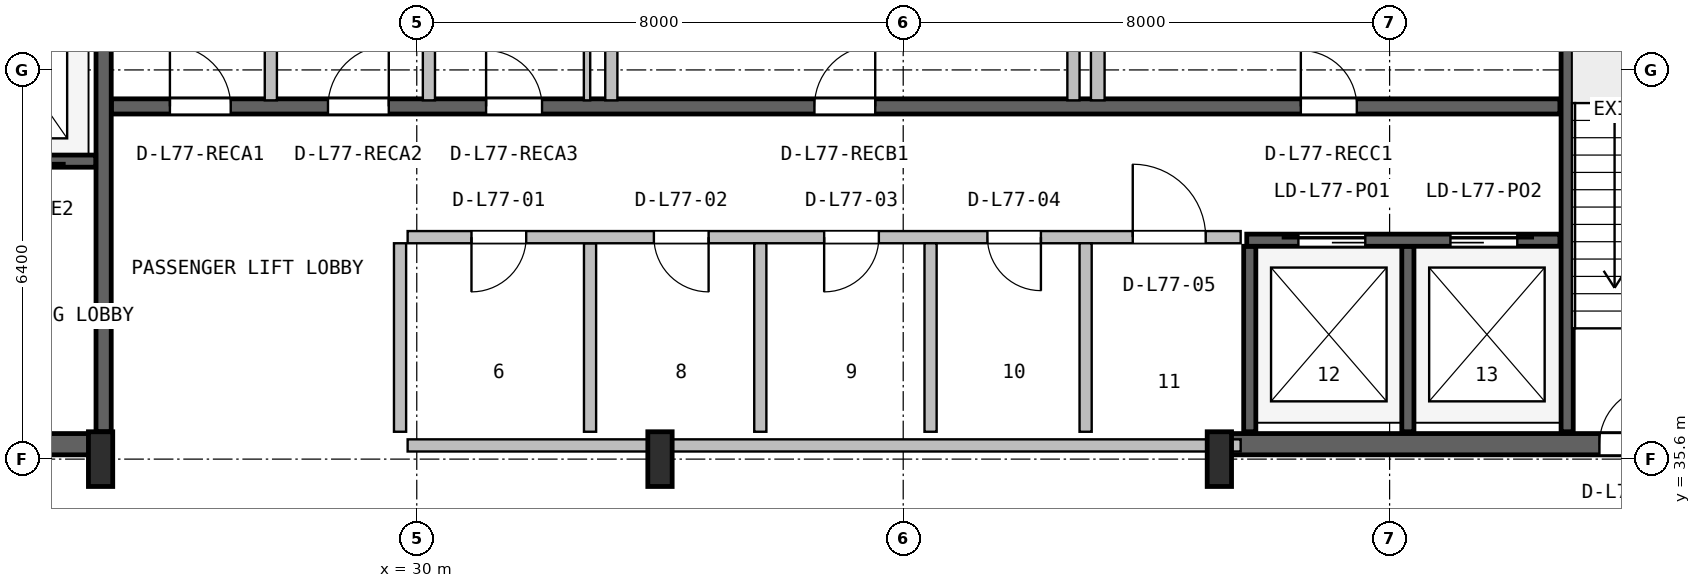
"""IFC4 building model, lengths in metres.
Left out: names, types, materials, properties, quantities, classifications, styles, units other than length and angle.
Written with IfcOpenShell. Run it as: python <this file> out.ifc"""

import sys

from ifc_helpers import new_model, si_unit, direction, frame, frame_2d, origin, origin_2d, place, context, subcontext, project, spatial, rectangle, i_section, extrude, source, transform, mapped, element, fill, save


model = new_model("IFC4")
c1 = context("Model", 3, precision=1e-05, world=origin(), true_north=direction((0.0, 1.0)))
c2 = subcontext(c1, "Body", "Model", "MODEL_VIEW")
j1 = project(units=[si_unit("LENGTHUNIT", "METRE"), si_unit("PLANEANGLEUNIT", "RADIAN")], contexts=[c1])
p1 = place(None, origin())
s1 = spatial("IfcSite", under=j1, at=p1, CompositionType="ELEMENT")
p2 = place(p1, origin())
s2 = spatial("IfcBuilding", under=s1, at=p2, CompositionType="ELEMENT")
p3 = place(p2, frame((0.0, 0.0, 309.8)))
s3 = spatial("IfcBuildingStorey", under=s2, at=p3, CompositionType="ELEMENT", Elevation=309.8)
p4 = place(p3, frame((15.67, 35.845, 0.0), z_axis=(0.0, 0.0, 1.0), x_axis=(1.0, 0.0, 0.0)))
e1 = element("IfcWall", 1, at=p4, inside=s3, PredefinedType="SHEAR", context=c2, shape_type="SweptSolid", body=[
    extrude(rectangle(XDim=9.13, YDim=0.35, at=frame_2d((4.565, 0.0))), origin(), (0.0, 0.0, 1.0), 4.48),
])
p5 = place(p4, frame((5.4, 0.0, 0.0)))
e2 = element("IfcOpeningElement", 2, at=p5, cuts=e1, PredefinedType="OPENING", context=c2, shape_type="SweptSolid", body=[
    extrude(rectangle(XDim=1.0, YDim=2.1, at=frame_2d((0.5, 1.05))), frame((0.0, 0.185, 0.0), z_axis=(0.0, -1.0, 0.0), x_axis=(1.0, 0.0, 0.0)), (0.0, 0.0, 1.0), 0.37),
])
p6 = place(p3, frame((43.2, 35.845, 0.0), z_axis=(0.0, 0.0, 1.0), x_axis=(1.0, 0.0, 0.0)))
e3 = element("IfcWall", 3, at=p6, inside=s3, PredefinedType="SHEAR", context=c2, shape_type="SweptSolid", body=[
    extrude(rectangle(XDim=9.13, YDim=0.35, at=frame_2d((4.565, 0.0))), origin(), (0.0, 0.0, 1.0), 4.48),
])
p7 = place(p6, frame((6.25, 0.0, 0.0)))
e4 = element("IfcOpeningElement", 4, at=p7, cuts=e3, PredefinedType="OPENING", context=c2, shape_type="SweptSolid", body=[
    extrude(rectangle(XDim=0.95, YDim=2.1, at=frame_2d((0.475, 1.05))), frame((0.0, 0.185, 0.0), z_axis=(0.0, -1.0, 0.0), x_axis=(1.0, 0.0, 0.0)), (0.0, 0.0, 1.0), 0.37),
])
m1 = source(origin(), c2, "Body", "SweptSolid", [
    extrude(i_section(OverallWidth=0.4, OverallDepth=0.9, WebThickness=0.016, FlangeThickness=0.028, FilletRadius=0.016, at=origin_2d()), origin(), (0.0, 0.0, 1.0), 4.8),
])
for number, where, z_axis, x_axis in (
    (5, (24.8, 35.6, 0.0), (0.0, 0.0, 1.0), (1.0, 0.0, 0.0)),
    (6, (34.0, 35.6, 0.0), (0.0, 0.0, 1.0), (1.0, 0.0, 0.0)),
    (7, (43.2, 35.6, 0.0), (0.0, 0.0, 1.0), (1.0, 0.0, 0.0)),
):
    element("IfcColumn", number, at=place(p3, frame(where, z_axis=z_axis, x_axis=x_axis)), inside=s3, PredefinedType="COLUMN", context=c2, shape_type="MappedRepresentation", body=[
        mapped(m1, transform((0.0, 0.0, 0.0), x_axis=(1.0, 0.0, 0.0), y_axis=(0.0, 1.0, 0.0), z_axis=(0.0, 0.0, 1.0), scale=1.0)),
    ])
p8 = place(p3, frame((24.85, 36.05, 0.0), z_axis=(0.0, 0.0, 1.0), x_axis=(0.0, 1.0, 0.0)))
e8 = element("IfcWall", 8, at=p8, inside=s3, PredefinedType="SHEAR", context=c2, shape_type="SweptSolid", body=[
    extrude(rectangle(XDim=10.45, YDim=0.25, at=frame_2d((5.225, 0.0))), origin(), (0.0, 0.0, 1.0), 4.48),
])
p9 = place(p3, frame((19.2, 40.5, 0.0), z_axis=(0.0, 0.0, 1.0), x_axis=(1.0, 0.0, 0.0)))
e9 = element("IfcWall", 9, at=p9, inside=s3, PredefinedType="SHEAR", context=c2, shape_type="SweptSolid", body=[
    extrude(rectangle(XDim=5.52, YDim=0.2, at=frame_2d((2.76, 0.0))), origin(), (0.0, 0.0, 1.0), 4.48),
])
p10 = place(p9, frame((1.05, 0.0, 0.0)))
e10 = element("IfcOpeningElement", 10, at=p10, cuts=e9, PredefinedType="OPENING", context=c2, shape_type="SweptSolid", body=[
    extrude(rectangle(XDim=1.1, YDim=2.18, at=frame_2d((0.55, 1.09))), frame((0.0, 0.11, 0.0), z_axis=(0.0, -1.0, 0.0), x_axis=(1.0, 0.0, 0.0)), (0.0, 0.0, 1.0), 0.22),
])
p11 = place(p9, frame((3.65, 0.0, 0.0)))
e11 = element("IfcOpeningElement", 11, at=p11, cuts=e9, PredefinedType="OPENING", context=c2, shape_type="SweptSolid", body=[
    extrude(rectangle(XDim=1.1, YDim=2.18, at=frame_2d((0.55, 1.09))), frame((0.0, 0.11, 0.0), z_axis=(0.0, -1.0, 0.0), x_axis=(1.0, 0.0, 0.0)), (0.0, 0.0, 1.0), 0.22),
])
p12 = place(p3, frame((48.92, 36.05, 0.0), z_axis=(0.0, 0.0, 1.0), x_axis=(0.0, 1.0, 0.0)))
e12 = element("IfcWall", 12, at=p12, inside=s3, PredefinedType="SHEAR", context=c2, shape_type="SweptSolid", body=[
    extrude(rectangle(XDim=10.5, YDim=0.2, at=frame_2d((5.25, 0.0))), origin(), (0.0, 0.0, 1.0), 4.48),
])
p13 = place(p3, frame((24.98, 41.4, 0.0), z_axis=(0.0, 0.0, 1.0), x_axis=(1.0, 0.0, 0.0)))
e13 = element("IfcWall", 13, at=p13, inside=s3, PredefinedType="SHEAR", context=c2, shape_type="SweptSolid", body=[
    extrude(rectangle(XDim=23.82, YDim=0.25, at=frame_2d((11.91, 0.0))), origin(), (0.0, 0.0, 1.0), 4.48),
])
p14 = place(p13, frame((0.96, 0.0, 0.0)))
e14 = element("IfcOpeningElement", 14, at=p14, cuts=e13, PredefinedType="OPENING", context=c2, shape_type="SweptSolid", body=[
    extrude(rectangle(XDim=1.0, YDim=2.08, at=frame_2d((0.5, 1.04))), frame((0.0, 0.135, 0.0), z_axis=(0.0, -1.0, 0.0), x_axis=(1.0, 0.0, 0.0)), (0.0, 0.0, 1.0), 0.27),
])
p15 = place(p13, frame((3.56, 0.0, 0.0)))
e15 = element("IfcOpeningElement", 15, at=p15, cuts=e13, PredefinedType="OPENING", context=c2, shape_type="SweptSolid", body=[
    extrude(rectangle(XDim=1.0, YDim=2.08, at=frame_2d((0.5, 1.04))), frame((0.0, 0.135, 0.0), z_axis=(0.0, -1.0, 0.0), x_axis=(1.0, 0.0, 0.0)), (0.0, 0.0, 1.0), 0.27),
])
p16 = place(p13, frame((6.16, 0.0, 0.0)))
e16 = element("IfcOpeningElement", 16, at=p16, cuts=e13, PredefinedType="OPENING", context=c2, shape_type="SweptSolid", body=[
    extrude(rectangle(XDim=0.92, YDim=2.08, at=frame_2d((0.46, 1.04))), frame((0.0, 0.135, 0.0), z_axis=(0.0, -1.0, 0.0), x_axis=(1.0, 0.0, 0.0)), (0.0, 0.0, 1.0), 0.27),
])
p17 = place(p13, frame((11.56, 0.0, 0.0)))
e17 = element("IfcOpeningElement", 17, at=p17, cuts=e13, PredefinedType="OPENING", context=c2, shape_type="SweptSolid", body=[
    extrude(rectangle(XDim=1.0, YDim=2.08, at=frame_2d((0.5, 1.04))), frame((0.0, 0.135, 0.0), z_axis=(0.0, -1.0, 0.0), x_axis=(1.0, 0.0, 0.0)), (0.0, 0.0, 1.0), 0.27),
])
p18 = place(p13, frame((19.56, 0.0, 0.0)))
e18 = element("IfcOpeningElement", 18, at=p18, cuts=e13, PredefinedType="OPENING", context=c2, shape_type="SweptSolid", body=[
    extrude(rectangle(XDim=0.92, YDim=2.08, at=frame_2d((0.46, 1.04))), frame((0.0, 0.135, 0.0), z_axis=(0.0, -1.0, 0.0), x_axis=(1.0, 0.0, 0.0)), (0.0, 0.0, 1.0), 0.27),
])
for number, where, z_axis, x_axis in (
    (19, (43.7, 36.05, 0.0), (0.0, 0.0, 1.0), (0.0, 1.0, 0.0)),
    (20, (46.3, 36.05, 0.0), (0.0, 0.0, 1.0), (0.0, 1.0, 0.0)),
):
    element("IfcWall", number, at=place(p3, frame(where, z_axis=z_axis, x_axis=x_axis)), inside=s3, PredefinedType="SHEAR", context=c2, shape_type="SweptSolid", body=[
        extrude(rectangle(XDim=3.05, YDim=0.2, at=frame_2d((1.525, 0.0))), origin(), (0.0, 0.0, 1.0), 4.48),
    ])
p19 = place(p3, frame((43.65, 39.2, 0.0), z_axis=(0.0, 0.0, 1.0), x_axis=(1.0, 0.0, 0.0)))
e21 = element("IfcWall", 21, at=p19, inside=s3, PredefinedType="SHEAR", context=c2, shape_type="SweptSolid", body=[
    extrude(rectangle(XDim=5.15, YDim=0.2, at=frame_2d((2.575, 0.0))), origin(), (0.0, 0.0, 1.0), 4.48),
])
p20 = place(p19, frame((0.85, 0.0, 0.0)))
e22 = element("IfcOpeningElement", 22, at=p20, cuts=e21, PredefinedType="OPENING", context=c2, shape_type="SweptSolid", body=[
    extrude(rectangle(XDim=1.1, YDim=2.18, at=frame_2d((0.55, 1.09))), frame((0.0, 0.11, 0.0), z_axis=(0.0, -1.0, 0.0), x_axis=(1.0, 0.0, 0.0)), (0.0, 0.0, 1.0), 0.22),
])
p21 = place(p19, frame((3.35, 0.0, 0.0)))
e23 = element("IfcOpeningElement", 23, at=p21, cuts=e21, PredefinedType="OPENING", context=c2, shape_type="SweptSolid", body=[
    extrude(rectangle(XDim=1.1, YDim=2.18, at=frame_2d((0.55, 1.09))), frame((0.0, 0.11, 0.0), z_axis=(0.0, -1.0, 0.0), x_axis=(1.0, 0.0, 0.0)), (0.0, 0.0, 1.0), 0.22),
])
p22 = place(p3, frame((29.85, 35.825, 0.0), z_axis=(0.0, 0.0, 1.0), x_axis=(1.0, 0.0, 0.0)))
e24 = element("IfcWall", 24, at=p22, inside=s3, PredefinedType="SOLIDWALL", context=c2, shape_type="SweptSolid", body=[
    extrude(rectangle(XDim=13.7, YDim=0.2, at=frame_2d((6.85, 0.0))), origin(), (0.0, 0.0, 1.0), 3.505),
])
p23 = place(p3, frame((32.85, 36.05, 0.0), z_axis=(0.0, 0.0, 1.0), x_axis=(0.0, 1.0, 0.0)))
e25 = element("IfcWall", 25, at=p23, inside=s3, PredefinedType="PLUMBINGWALL", context=c2, shape_type="SweptSolid", body=[
    extrude(rectangle(XDim=3.1, YDim=0.2, at=frame_2d((1.55, 0.0))), origin(), (0.0, 0.0, 1.0), 4.46),
])
p24 = place(p3, frame((29.85, 39.25, 0.0), z_axis=(0.0, 0.0, 1.0), x_axis=(1.0, 0.0, 0.0)))
e26 = element("IfcWall", 26, at=p24, inside=s3, PredefinedType="SOLIDWALL", context=c2, shape_type="SweptSolid", body=[
    extrude(rectangle(XDim=13.7, YDim=0.2, at=frame_2d((6.85, 0.0))), origin(), (0.0, 0.0, 1.0), 4.46),
])
p25 = place(p24, frame((1.05, 0.0, 0.0)))
e27 = element("IfcOpeningElement", 27, at=p25, cuts=e26, PredefinedType="OPENING", context=c2, shape_type="SweptSolid", body=[
    extrude(rectangle(XDim=0.9, YDim=2.06, at=frame_2d((0.45, 1.03))), frame((0.0, 0.11, 0.0), z_axis=(0.0, -1.0, 0.0), x_axis=(1.0, 0.0, 0.0)), (0.0, 0.0, 1.0), 0.22),
])
p26 = place(p24, frame((4.05, 0.0, 0.0)))
e28 = element("IfcOpeningElement", 28, at=p26, cuts=e26, PredefinedType="OPENING", context=c2, shape_type="SweptSolid", body=[
    extrude(rectangle(XDim=0.9, YDim=2.06, at=frame_2d((0.45, 1.03))), frame((0.0, 0.11, 0.0), z_axis=(0.0, -1.0, 0.0), x_axis=(1.0, 0.0, 0.0)), (0.0, 0.0, 1.0), 0.22),
])
p27 = place(p24, frame((6.85, 0.0, 0.0)))
e29 = element("IfcOpeningElement", 29, at=p27, cuts=e26, PredefinedType="OPENING", context=c2, shape_type="SweptSolid", body=[
    extrude(rectangle(XDim=0.9, YDim=2.06, at=frame_2d((0.45, 1.03))), frame((0.0, 0.11, 0.0), z_axis=(0.0, -1.0, 0.0), x_axis=(1.0, 0.0, 0.0)), (0.0, 0.0, 1.0), 0.22),
])
p28 = place(p24, frame((9.535, 0.0, 0.0)))
e30 = element("IfcOpeningElement", 30, at=p28, cuts=e26, PredefinedType="OPENING", context=c2, shape_type="SweptSolid", body=[
    extrude(rectangle(XDim=0.88, YDim=2.06, at=frame_2d((0.44, 1.03))), frame((0.0, 0.11, 0.0), z_axis=(0.0, -1.0, 0.0), x_axis=(1.0, 0.0, 0.0)), (0.0, 0.0, 1.0), 0.22),
])
p29 = place(p24, frame((11.925, 0.0, 0.0)))
e31 = element("IfcOpeningElement", 31, at=p29, cuts=e26, PredefinedType="OPENING", context=c2, shape_type="SweptSolid", body=[
    extrude(rectangle(XDim=1.2, YDim=2.1, at=frame_2d((0.6, 1.05))), frame((0.0, 0.11, 0.0), z_axis=(0.0, -1.0, 0.0), x_axis=(1.0, 0.0, 0.0)), (0.0, 0.0, 1.0), 0.22),
])
for number, where, z_axis, x_axis in (
    (32, (29.725, 36.05, 0.0), (0.0, 0.0, 1.0), (0.0, 1.0, 0.0)),
    (33, (35.65, 36.05, 0.0), (0.0, 0.0, 1.0), (0.0, 1.0, 0.0)),
    (34, (38.45, 36.05, 0.0), (0.0, 0.0, 1.0), (0.0, 1.0, 0.0)),
):
    element("IfcWall", number, at=place(p3, frame(where, z_axis=z_axis, x_axis=x_axis)), inside=s3, PredefinedType="PLUMBINGWALL", context=c2, shape_type="SweptSolid", body=[
        extrude(rectangle(XDim=3.1, YDim=0.2, at=frame_2d((1.55, 0.0))), origin(), (0.0, 0.0, 1.0), 4.46),
    ])
p30 = place(p3, frame((41.0, 36.05, 0.0), z_axis=(0.0, 0.0, 1.0), x_axis=(0.0, 1.0, 0.0)))
e35 = element("IfcWall", 35, at=p30, inside=s3, PredefinedType="SOLIDWALL", context=c2, shape_type="SweptSolid", body=[
    extrude(rectangle(XDim=3.1, YDim=0.2, at=frame_2d((1.55, 0.0))), origin(), (0.0, 0.0, 1.0), 4.46),
])
for number, where, z_axis, x_axis in (
    (36, (27.6, 41.5, 0.0), (0.0, 0.0, 1.0), (0.0, 1.0, 0.0)),
    (37, (30.2, 41.5, 0.0), (0.0, 0.0, 1.0), (0.0, 1.0, 0.0)),
):
    element("IfcWall", number, at=place(p3, frame(where, z_axis=z_axis, x_axis=x_axis)), inside=s3, PredefinedType="SOLIDWALL", context=c2, shape_type="SweptSolid", body=[
        extrude(rectangle(XDim=5.02, YDim=0.2, at=frame_2d((2.51, 0.0))), origin(), (0.0, 0.0, 1.0), 4.46),
    ])
p31 = place(p3, frame((32.8, 41.5, 0.0), z_axis=(0.0, 0.0, 1.0), x_axis=(0.0, 1.0, 0.0)))
e38 = element("IfcWall", 38, at=p31, inside=s3, PredefinedType="PARTITIONING", context=c2, shape_type="SweptSolid", body=[
    extrude(rectangle(XDim=5.02, YDim=0.105, at=frame_2d((2.51, 0.0))), origin(), (0.0, 0.0, 1.0), 4.46),
])
for number, where, z_axis, x_axis in (
    (39, (40.8, 41.5, 0.0), (0.0, 0.0, 1.0), (0.0, 1.0, 0.0)),
    (40, (33.2, 41.5, 0.0), (0.0, 0.0, 1.0), (0.0, 1.0, 0.0)),
):
    element("IfcWall", number, at=place(p3, frame(where, z_axis=z_axis, x_axis=x_axis)), inside=s3, PredefinedType="SOLIDWALL", context=c2, shape_type="SweptSolid", body=[
        extrude(rectangle(XDim=5.02, YDim=0.2, at=frame_2d((2.51, 0.0))), origin(), (0.0, 0.0, 1.0), 4.46),
    ])
p32 = place(p3, frame((41.2, 41.5, 0.0), z_axis=(0.0, 0.0, 1.0), x_axis=(0.0, 1.0, 0.0)))
e41 = element("IfcWall", 41, at=p32, inside=s3, PredefinedType="PARTITIONING", context=c2, shape_type="SweptSolid", body=[
    extrude(rectangle(XDim=5.02, YDim=0.225, at=frame_2d((2.51, 0.0))), origin(), (0.0, 0.0, 1.0), 4.46),
])
m2 = source(origin(), c2, "Body", "SweptSolid", [
    extrude(rectangle(XDim=0.95, YDim=2.1, at=frame_2d((0.475, 1.05))), frame((0.0, 0.025, 0.0), z_axis=(0.0, -1.0, 0.0), x_axis=(1.0, 0.0, 0.0)), (0.0, 0.0, 1.0), 0.05),
])
p33 = place(p7, origin())
e42 = element("IfcDoor", 42, at=p33, inside=s3, OperationType="SINGLE_SWING_RIGHT", PredefinedType="DOOR", context=c2, shape_type="MappedRepresentation", body=[
    mapped(m2, transform((0.0, 0.0, 0.0), x_axis=(1.0, 0.0, 0.0), y_axis=(0.0, 1.0, 0.0), z_axis=(0.0, 0.0, 1.0), scale=1.0)),
])
fill(e4, e42)
m3 = source(origin(), c2, "Body", "SweptSolid", [
    extrude(rectangle(XDim=1.0, YDim=2.08, at=frame_2d((0.5, 1.04))), frame((0.0, 0.025, 0.0), z_axis=(0.0, -1.0, 0.0), x_axis=(1.0, 0.0, 0.0)), (0.0, 0.0, 1.0), 0.05),
])
p34 = place(p14, origin())
e43 = element("IfcDoor", 43, at=p34, inside=s3, OperationType="SINGLE_SWING_LEFT", PredefinedType="DOOR", context=c2, shape_type="MappedRepresentation", body=[
    mapped(m3, transform((0.0, 0.0, 0.0), x_axis=(1.0, 0.0, 0.0), y_axis=(0.0, 1.0, 0.0), z_axis=(0.0, 0.0, 1.0), scale=1.0)),
])
fill(e14, e43)
p35 = place(p15, origin())
e44 = element("IfcDoor", 44, at=p35, inside=s3, OperationType="SINGLE_SWING_RIGHT", PredefinedType="DOOR", context=c2, shape_type="MappedRepresentation", body=[
    mapped(m3, transform((0.0, 0.0, 0.0), x_axis=(1.0, 0.0, 0.0), y_axis=(0.0, 1.0, 0.0), z_axis=(0.0, 0.0, 1.0), scale=1.0)),
])
fill(e15, e44)
m4 = source(origin(), c2, "Body", "SweptSolid", [
    extrude(rectangle(XDim=0.92, YDim=2.08, at=frame_2d((0.46, 1.04))), frame((0.0, 0.025, 0.0), z_axis=(0.0, -1.0, 0.0), x_axis=(1.0, 0.0, 0.0)), (0.0, 0.0, 1.0), 0.05),
])
p36 = place(p16, origin())
e45 = element("IfcDoor", 45, at=p36, inside=s3, OperationType="SINGLE_SWING_LEFT", PredefinedType="DOOR", context=c2, shape_type="MappedRepresentation", body=[
    mapped(m4, transform((0.0, 0.0, 0.0), x_axis=(1.0, 0.0, 0.0), y_axis=(0.0, 1.0, 0.0), z_axis=(0.0, 0.0, 1.0), scale=1.0)),
])
fill(e16, e45)
p37 = place(p17, origin())
e46 = element("IfcDoor", 46, at=p37, inside=s3, OperationType="SINGLE_SWING_RIGHT", PredefinedType="DOOR", context=c2, shape_type="MappedRepresentation", body=[
    mapped(m3, transform((0.0, 0.0, 0.0), x_axis=(1.0, 0.0, 0.0), y_axis=(0.0, 1.0, 0.0), z_axis=(0.0, 0.0, 1.0), scale=1.0)),
])
fill(e17, e46)
p38 = place(p18, origin())
e47 = element("IfcDoor", 47, at=p38, inside=s3, OperationType="SINGLE_SWING_LEFT", PredefinedType="DOOR", context=c2, shape_type="MappedRepresentation", body=[
    mapped(m4, transform((0.0, 0.0, 0.0), x_axis=(1.0, 0.0, 0.0), y_axis=(0.0, 1.0, 0.0), z_axis=(0.0, 0.0, 1.0), scale=1.0)),
])
fill(e18, e47)
m5 = source(origin(), c2, "Body", "SweptSolid", [
    extrude(rectangle(XDim=1.1, YDim=2.18, at=frame_2d((0.55, 1.09))), frame((0.0, 0.025, 0.0), z_axis=(0.0, -1.0, 0.0), x_axis=(1.0, 0.0, 0.0)), (0.0, 0.0, 1.0), 0.05),
])
p39 = place(p20, origin())
e48 = element("IfcDoor", 48, at=p39, inside=s3, OperationType="SLIDING_TO_LEFT", PredefinedType="DOOR", context=c2, shape_type="MappedRepresentation", body=[
    mapped(m5, transform((0.0, 0.0, 0.0), x_axis=(1.0, 0.0, 0.0), y_axis=(0.0, 1.0, 0.0), z_axis=(0.0, 0.0, 1.0), scale=1.0)),
])
fill(e22, e48)
p40 = place(p21, origin())
e49 = element("IfcDoor", 49, at=p40, inside=s3, OperationType="SLIDING_TO_RIGHT", PredefinedType="DOOR", context=c2, shape_type="MappedRepresentation", body=[
    mapped(m5, transform((0.0, 0.0, 0.0), x_axis=(1.0, 0.0, 0.0), y_axis=(0.0, 1.0, 0.0), z_axis=(0.0, 0.0, 1.0), scale=1.0)),
])
fill(e23, e49)
m6 = source(origin(), c2, "Body", "SweptSolid", [
    extrude(rectangle(XDim=0.9, YDim=2.06, at=frame_2d((0.45, 1.03))), frame((0.0, 0.025, 0.0), z_axis=(0.0, -1.0, 0.0), x_axis=(1.0, 0.0, 0.0)), (0.0, 0.0, 1.0), 0.05),
])
p41 = place(p25, frame((0.9, 0.0, 0.0), z_axis=(0.0, 0.0, 1.0), x_axis=(-1.0, 0.0, 0.0)))
e50 = element("IfcDoor", 50, at=p41, inside=s3, OperationType="SINGLE_SWING_LEFT", PredefinedType="DOOR", context=c2, shape_type="MappedRepresentation", body=[
    mapped(m6, transform((0.0, 0.0, 0.0), x_axis=(1.0, 0.0, 0.0), y_axis=(0.0, 1.0, 0.0), z_axis=(0.0, 0.0, 1.0), scale=1.0)),
])
fill(e27, e50)
p42 = place(p26, frame((0.9, 0.0, 0.0), z_axis=(0.0, 0.0, 1.0), x_axis=(-1.0, 0.0, 0.0)))
e51 = element("IfcDoor", 51, at=p42, inside=s3, OperationType="SINGLE_SWING_RIGHT", PredefinedType="DOOR", context=c2, shape_type="MappedRepresentation", body=[
    mapped(m6, transform((0.0, 0.0, 0.0), x_axis=(1.0, 0.0, 0.0), y_axis=(0.0, 1.0, 0.0), z_axis=(0.0, 0.0, 1.0), scale=1.0)),
])
fill(e28, e51)
p43 = place(p27, frame((0.9, 0.0, 0.0), z_axis=(0.0, 0.0, 1.0), x_axis=(-1.0, 0.0, 0.0)))
e52 = element("IfcDoor", 52, at=p43, inside=s3, OperationType="SINGLE_SWING_LEFT", PredefinedType="DOOR", context=c2, shape_type="MappedRepresentation", body=[
    mapped(m6, transform((0.0, 0.0, 0.0), x_axis=(1.0, 0.0, 0.0), y_axis=(0.0, 1.0, 0.0), z_axis=(0.0, 0.0, 1.0), scale=1.0)),
])
fill(e29, e52)
m7 = source(origin(), c2, "Body", "SweptSolid", [
    extrude(rectangle(XDim=0.88, YDim=2.06, at=frame_2d((0.44, 1.03))), frame((0.0, 0.025, 0.0), z_axis=(0.0, -1.0, 0.0), x_axis=(1.0, 0.0, 0.0)), (0.0, 0.0, 1.0), 0.05),
])
p44 = place(p28, frame((0.88, 0.0, 0.0), z_axis=(0.0, 0.0, 1.0), x_axis=(-1.0, 0.0, 0.0)))
e53 = element("IfcDoor", 53, at=p44, inside=s3, OperationType="SINGLE_SWING_RIGHT", PredefinedType="DOOR", context=c2, shape_type="MappedRepresentation", body=[
    mapped(m7, transform((0.0, 0.0, 0.0), x_axis=(1.0, 0.0, 0.0), y_axis=(0.0, 1.0, 0.0), z_axis=(0.0, 0.0, 1.0), scale=1.0)),
])
fill(e30, e53)
m8 = source(origin(), c2, "Body", "SweptSolid", [
    extrude(rectangle(XDim=1.2, YDim=2.1, at=frame_2d((0.6, 1.05))), frame((0.0, 0.025, 0.0), z_axis=(0.0, -1.0, 0.0), x_axis=(1.0, 0.0, 0.0)), (0.0, 0.0, 1.0), 0.05),
])
p45 = place(p29, origin())
e54 = element("IfcDoor", 54, at=p45, inside=s3, OperationType="SINGLE_SWING_LEFT", PredefinedType="DOOR", context=c2, shape_type="MappedRepresentation", body=[
    mapped(m8, transform((0.0, 0.0, 0.0), x_axis=(1.0, 0.0, 0.0), y_axis=(0.0, 1.0, 0.0), z_axis=(0.0, 0.0, 1.0), scale=1.0)),
])
fill(e31, e54)
save(model, sys.argv[1])
